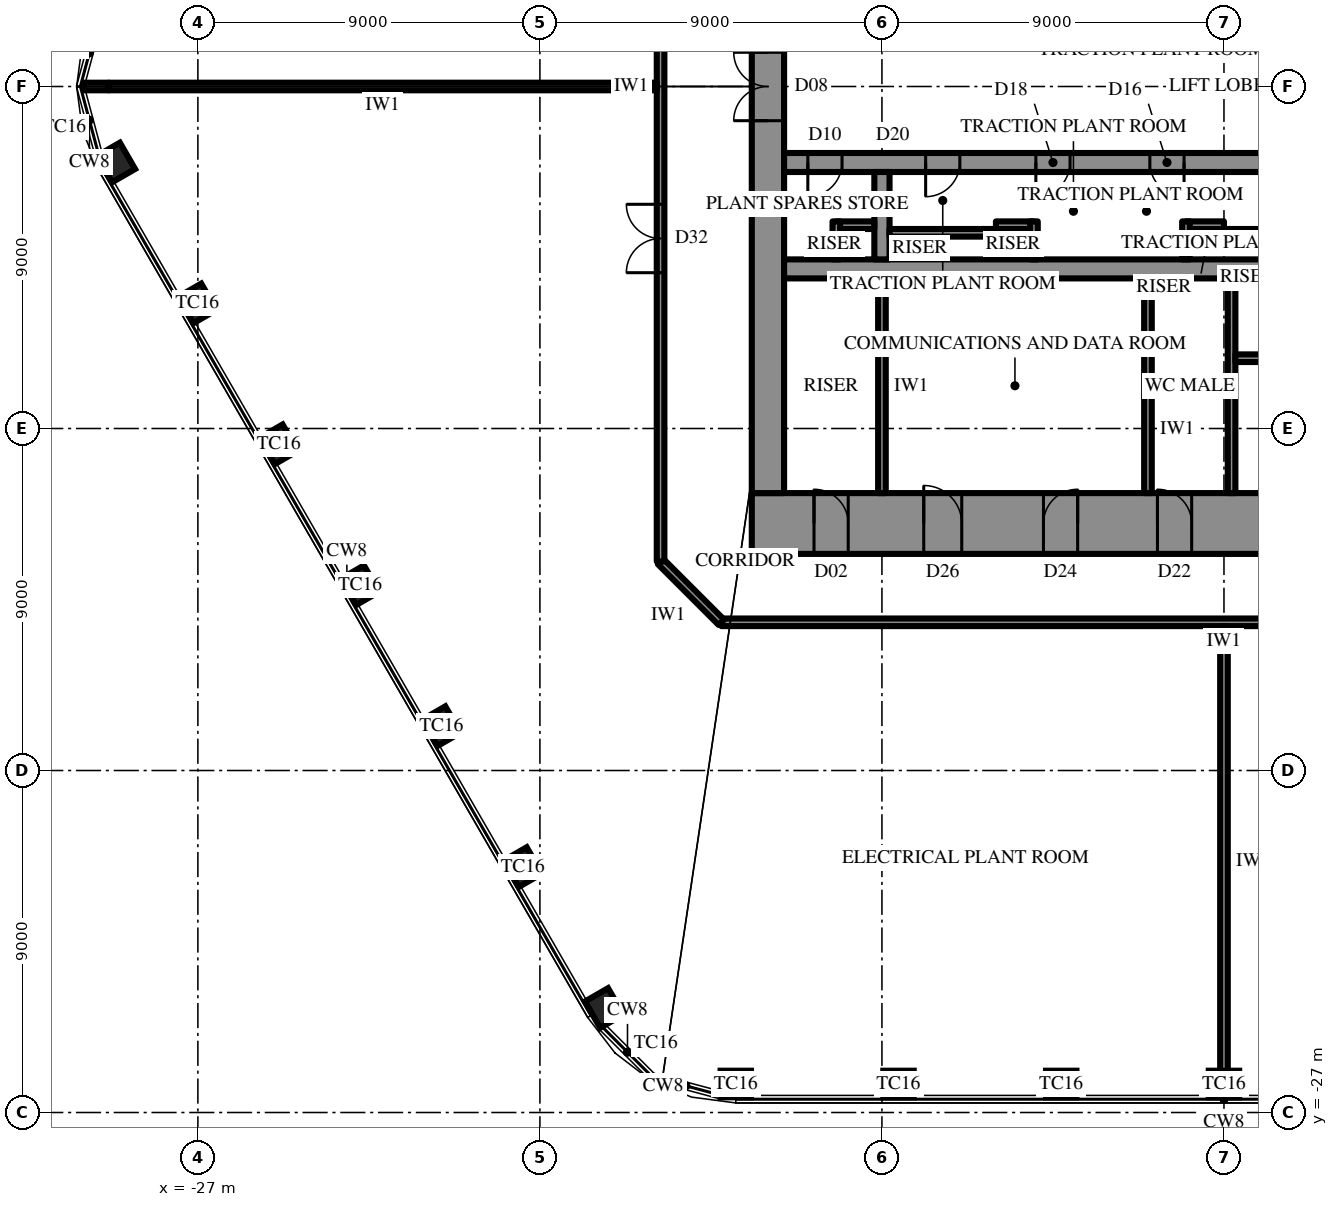
"""IFC4 building model, lengths in metres.
Left out: names, types, materials, properties, quantities, classifications, styles, units other than length and angle.
Written with IfcOpenShell. Run it as: python <this file> out.ifc"""

import sys

from ifc_helpers import new_model, si_unit, direction, frame, frame_2d, origin, origin_2d, place, context, subcontext, project, spatial, rectangle, extrude, element, fill, save


model = new_model("IFC4")
c1 = context("Model", 3, precision=1e-05, world=origin(), true_north=direction((0.0, 1.0)))
c2 = subcontext(c1, "Body", "Model", "MODEL_VIEW")
j1 = project(units=[si_unit("LENGTHUNIT", "METRE"), si_unit("PLANEANGLEUNIT", "RADIAN")], contexts=[c1])
p1 = place(None, origin())
s1 = spatial("IfcSite", under=j1, at=p1, CompositionType="ELEMENT")
p2 = place(p1, origin())
s2 = spatial("IfcBuilding", under=s1, at=p2, CompositionType="ELEMENT")
p3 = place(p2, frame((0.0, 0.0, 396.3)))
s3 = spatial("IfcBuildingStorey", under=s2, at=p3, CompositionType="ELEMENT", Elevation=396.3)
for number, where, z_axis, x_axis in (
    (1, (-29.156, -2.0, 0.0), (0.0, 0.0, 1.0), (0.5, -0.866, 0.0)),
    (2, (-27.015, -5.708, 0.0), (0.0, 0.0, 1.0), (0.5, -0.866, 0.0)),
    (3, (-24.874, -9.417, 0.0), (0.0, 0.0, 1.0), (0.5, -0.866, 0.0)),
    (4, (-22.733, -13.125, 0.0), (0.0, 0.0, 1.0), (0.5, -0.866, 0.0)),
    (5, (-20.592, -16.833, 0.0), (0.0, 0.0, 1.0), (0.5, -0.866, 0.0)),
    (6, (-18.451, -20.542, 0.0), (0.0, 0.0, 1.0), (0.5, -0.866, 0.0)),
    (7, (-16.31, -24.25, 0.0), (0.0, 0.0, 1.0), (0.5, -0.866, 0.0)),
    (8, (-12.846, -26.25, 0.0), (0.0, 0.0, 1.0), (1.0, 0.0, 0.0)),
    (9, (-8.564, -26.25, 0.0), (0.0, 0.0, 1.0), (1.0, 0.0, 0.0)),
    (10, (-4.282, -26.25, 0.0), (0.0, 0.0, 1.0), (1.0, 0.0, 0.0)),
    (11, (0.0, -26.25, 0.0), (0.0, 0.0, 1.0), (1.0, 0.0, 0.0)),
):
    element("IfcColumn", number, at=place(p3, frame(where, z_axis=z_axis, x_axis=x_axis)), inside=s3, PredefinedType="COLUMN", context=c2, shape_type="SweptSolid", body=[
        extrude(rectangle(XDim=0.8, YDim=0.7, at=origin_2d()), origin(), (0.0, 0.0, 1.0), 6.0),
    ])
p4 = place(p3, frame((12.425, -11.5, 0.0), z_axis=(0.0, 0.0, 1.0), x_axis=(-1.0, 0.0, 0.0)))
e12 = element("IfcWall", 12, at=p4, inside=s3, PredefinedType="SHEAR", context=c2, shape_type="SweptSolid", body=[
    extrude(rectangle(XDim=24.85, YDim=1.6, at=frame_2d((12.425, 0.0))), origin(), (0.0, 0.0, 1.0), 6.0),
])
p5 = place(p4, frame((13.275, 0.0, 0.0)))
e13 = element("IfcOpeningElement", 13, at=p5, cuts=e12, PredefinedType="OPENING", context=c2, shape_type="SweptSolid", body=[
    extrude(rectangle(XDim=0.9, YDim=2.2, at=frame_2d((0.45, 1.1))), frame((0.0, 0.81, 0.0), z_axis=(0.0, -1.0, 0.0), x_axis=(1.0, 0.0, 0.0)), (0.0, 0.0, 1.0), 1.62),
])
p6 = place(p4, frame((16.275, 0.0, 0.0)))
e14 = element("IfcOpeningElement", 14, at=p6, cuts=e12, PredefinedType="OPENING", context=c2, shape_type="SweptSolid", body=[
    extrude(rectangle(XDim=0.9, YDim=2.2, at=frame_2d((0.45, 1.1))), frame((0.0, 0.81, 0.0), z_axis=(0.0, -1.0, 0.0), x_axis=(1.0, 0.0, 0.0)), (0.0, 0.0, 1.0), 1.62),
])
p7 = place(p4, frame((19.325, 0.0, 0.0)))
e15 = element("IfcOpeningElement", 15, at=p7, cuts=e12, PredefinedType="OPENING", context=c2, shape_type="SweptSolid", body=[
    extrude(rectangle(XDim=1.0, YDim=2.2, at=frame_2d((0.5, 1.1))), frame((0.0, 0.81, 0.0), z_axis=(0.0, -1.0, 0.0), x_axis=(1.0, 0.0, 0.0)), (0.0, 0.0, 1.0), 1.62),
])
p8 = place(p4, frame((1.637, 0.0, 0.0)))
e16 = element("IfcOpeningElement", 16, at=p8, cuts=e12, PredefinedType="OPENING", context=c2, shape_type="SweptSolid", body=[
    extrude(rectangle(XDim=0.9, YDim=2.2, at=frame_2d((0.45, 1.1))), frame((0.0, 0.81, 0.0), z_axis=(0.0, -1.0, 0.0), x_axis=(1.0, 0.0, 0.0)), (0.0, 0.0, 1.0), 1.62),
])
p9 = place(p4, frame((22.312, 0.0, 0.0)))
e17 = element("IfcOpeningElement", 17, at=p9, cuts=e12, PredefinedType="OPENING", context=c2, shape_type="SweptSolid", body=[
    extrude(rectangle(XDim=0.9, YDim=2.2, at=frame_2d((0.45, 1.1))), frame((0.0, 0.81, 0.0), z_axis=(0.0, -1.0, 0.0), x_axis=(1.0, 0.0, 0.0)), (0.0, 0.0, 1.0), 1.62),
])
p10 = place(p3, frame((-12.0, 10.7, 0.0), z_axis=(0.0, 0.0, 1.0), x_axis=(0.0, -1.0, 0.0)))
e18 = element("IfcWall", 18, at=p10, inside=s3, PredefinedType="SHEAR", context=c2, shape_type="SweptSolid", body=[
    extrude(rectangle(XDim=21.4, YDim=0.85, at=frame_2d((10.7, 0.0))), origin(), (0.0, 0.0, 1.0), 6.0),
])
p11 = place(p10, frame((9.8, 0.0, 0.0)))
e19 = element("IfcOpeningElement", 19, at=p11, cuts=e18, PredefinedType="OPENING", context=c2, shape_type="SweptSolid", body=[
    extrude(rectangle(XDim=1.8, YDim=2.4, at=frame_2d((0.9, 1.2))), frame((0.0, 0.435, 0.0), z_axis=(0.0, -1.0, 0.0), x_axis=(1.0, 0.0, 0.0)), (0.0, 0.0, 1.0), 0.87),
])
p12 = place(p3, frame((3.2, -2.0, 0.0), z_axis=(0.0, 0.0, 1.0), x_axis=(-1.0, 0.0, 0.0)))
e20 = element("IfcWall", 20, at=p12, inside=s3, PredefinedType="SHEAR", context=c2, shape_type="SweptSolid", body=[
    extrude(rectangle(XDim=14.775, YDim=0.5, at=frame_2d((7.387, 0.0))), origin(), (0.0, 0.0, 1.0), 6.0),
])
p13 = place(p12, frame((1.35, 0.0, 0.0)))
e21 = element("IfcOpeningElement", 21, at=p13, cuts=e20, PredefinedType="OPENING", context=c2, shape_type="SweptSolid", body=[
    extrude(rectangle(XDim=0.9, YDim=2.2, at=frame_2d((0.45, 1.1))), frame((0.0, 0.26, 0.0), z_axis=(0.0, -1.0, 0.0), x_axis=(1.0, 0.0, 0.0)), (0.0, 0.0, 1.0), 0.52),
])
p14 = place(p12, frame((4.25, 0.0, 0.0)))
e22 = element("IfcOpeningElement", 22, at=p14, cuts=e20, PredefinedType="OPENING", context=c2, shape_type="SweptSolid", body=[
    extrude(rectangle(XDim=0.9, YDim=2.2, at=frame_2d((0.45, 1.1))), frame((0.0, 0.26, 0.0), z_axis=(0.0, -1.0, 0.0), x_axis=(1.0, 0.0, 0.0)), (0.0, 0.0, 1.0), 0.52),
])
p15 = place(p12, frame((7.25, 0.0, 0.0)))
e23 = element("IfcOpeningElement", 23, at=p15, cuts=e20, PredefinedType="OPENING", context=c2, shape_type="SweptSolid", body=[
    extrude(rectangle(XDim=0.9, YDim=2.2, at=frame_2d((0.45, 1.1))), frame((0.0, 0.26, 0.0), z_axis=(0.0, -1.0, 0.0), x_axis=(1.0, 0.0, 0.0)), (0.0, 0.0, 1.0), 0.52),
])
p16 = place(p12, frame((10.15, 0.0, 0.0)))
e24 = element("IfcOpeningElement", 24, at=p16, cuts=e20, PredefinedType="OPENING", context=c2, shape_type="SweptSolid", body=[
    extrude(rectangle(XDim=0.9, YDim=2.2, at=frame_2d((0.45, 1.1))), frame((0.0, 0.26, 0.0), z_axis=(0.0, -1.0, 0.0), x_axis=(1.0, 0.0, 0.0)), (0.0, 0.0, 1.0), 0.52),
])
p17 = place(p12, frame((13.25, 0.0, 0.0)))
e25 = element("IfcOpeningElement", 25, at=p17, cuts=e20, PredefinedType="OPENING", context=c2, shape_type="SweptSolid", body=[
    extrude(rectangle(XDim=0.9, YDim=2.2, at=frame_2d((0.45, 1.1))), frame((0.0, 0.26, 0.0), z_axis=(0.0, -1.0, 0.0), x_axis=(1.0, 0.0, 0.0)), (0.0, 0.0, 1.0), 0.52),
])
p18 = place(p3, frame((11.575, -4.8, 0.0), z_axis=(0.0, 0.0, 1.0), x_axis=(-1.0, 0.0, 0.0)))
e26 = element("IfcWall", 26, at=p18, inside=s3, PredefinedType="SHEAR", context=c2, shape_type="SweptSolid", body=[
    extrude(rectangle(XDim=23.15, YDim=0.5, at=frame_2d((11.575, 0.0))), origin(), (0.0, 0.0, 1.0), 6.0),
])
p19 = place(p18, frame((6.475, 0.0, 0.0)))
e27 = element("IfcOpeningElement", 27, at=p19, cuts=e26, PredefinedType="OPENING", context=c2, shape_type="SweptSolid", body=[
    extrude(rectangle(XDim=1.2, YDim=2.2, at=frame_2d((0.6, 1.1))), frame((0.0, 0.26, 0.0), z_axis=(0.0, -1.0, 0.0), x_axis=(1.0, 0.0, 0.0)), (0.0, 0.0, 1.0), 0.52),
])
p20 = place(p18, frame((3.475, 0.0, 0.0)))
e28 = element("IfcOpeningElement", 28, at=p20, cuts=e26, PredefinedType="OPENING", context=c2, shape_type="SweptSolid", body=[
    extrude(rectangle(XDim=1.2, YDim=2.2, at=frame_2d((0.6, 1.1))), frame((0.0, 0.26, 0.0), z_axis=(0.0, -1.0, 0.0), x_axis=(1.0, 0.0, 0.0)), (0.0, 0.0, 1.0), 0.52),
])
p21 = place(p3, frame((-9.0, -2.25, 0.0), z_axis=(0.0, 0.0, 1.0), x_axis=(0.0, -1.0, 0.0)))
e29 = element("IfcWall", 29, at=p21, inside=s3, PredefinedType="SHEAR", context=c2, shape_type="SweptSolid", body=[
    extrude(rectangle(XDim=2.3, YDim=0.4, at=frame_2d((1.15, 0.0))), origin(), (0.0, 0.0, 1.0), 6.0),
])
p22 = place(p3, frame((0.2, -5.05, 0.0), z_axis=(0.0, 0.0, 1.0), x_axis=(0.0, -1.0, 0.0)))
e30 = element("IfcWall", 30, at=p22, inside=s3, PredefinedType="SHEAR", context=c2, shape_type="SweptSolid", body=[
    extrude(rectangle(XDim=5.65, YDim=0.2, at=frame_2d((2.825, 0.0))), origin(), (0.0, 0.0, 1.0), 6.0),
])
p23 = place(p3, frame((8.9, -7.15, 0.0), z_axis=(0.0, 0.0, 1.0), x_axis=(-1.0, 0.0, 0.0)))
e31 = element("IfcWall", 31, at=p23, inside=s3, PredefinedType="SHEAR", context=c2, shape_type="SweptSolid", body=[
    extrude(rectangle(XDim=8.6, YDim=0.2, at=frame_2d((4.3, 0.0))), origin(), (0.0, 0.0, 1.0), 6.0),
])
p24 = place(p23, frame((0.3, 0.0, 0.0)))
e32 = element("IfcOpeningElement", 32, at=p24, cuts=e31, PredefinedType="OPENING", context=c2, shape_type="SweptSolid", body=[
    extrude(rectangle(XDim=1.0, YDim=2.2, at=frame_2d((0.5, 1.1))), frame((0.0, 0.11, 0.0), z_axis=(0.0, -1.0, 0.0), x_axis=(1.0, 0.0, 0.0)), (0.0, 0.0, 1.0), 0.22),
])
for number, where, z_axis, x_axis in (
    (33, (-9.0, -5.05, 0.0), (0.0, 0.0, 1.0), (0.0, -1.0, 0.0)),
    (34, (-2.0, -5.05, 0.0), (0.0, 0.0, 1.0), (0.0, -1.0, 0.0)),
):
    element("IfcWall", number, at=place(p3, frame(where, z_axis=z_axis, x_axis=x_axis)), inside=s3, PredefinedType="PARTITIONING", context=c2, shape_type="SweptSolid", body=[
        extrude(rectangle(XDim=5.65, YDim=0.2, at=frame_2d((2.825, 0.0))), origin(), (0.0, 0.0, 1.0), 5.8),
    ])
p25 = place(p3, frame((2.8, -3.85, 0.0), z_axis=(0.0, 0.0, 1.0), x_axis=(-1.0, 0.0, 0.0)))
e35 = element("IfcWall", 35, at=p25, inside=s3, PredefinedType="PARTITIONING", context=c2, shape_type="SweptSolid", body=[
    extrude(rectangle(XDim=2.8, YDim=0.2, at=frame_2d((1.4, 0.0))), origin(), (0.0, 0.0, 1.0), 5.8),
])
for number, where, z_axis, x_axis in (
    (36, (0.0, -3.65, 0.0), (0.0, 0.0, 1.0), (-1.0, 0.0, 0.0)),
    (37, (-1.0, -3.55, 0.0), (0.0, 0.0, 1.0), (0.0, -1.0, 0.0)),
    (38, (-5.0, -3.65, 0.0), (0.0, 0.0, 1.0), (-1.0, 0.0, 0.0)),
    (39, (-5.0, -3.55, 0.0), (0.0, 0.0, 1.0), (0.0, -1.0, 0.0)),
):
    element("IfcWall", number, at=place(p3, frame(where, z_axis=z_axis, x_axis=x_axis)), inside=s3, PredefinedType="PARTITIONING", context=c2, shape_type="SweptSolid", body=[
        extrude(rectangle(XDim=1.0, YDim=0.2, at=frame_2d((0.5, 0.0))), origin(), (0.0, 0.0, 1.0), 5.8),
    ])
p26 = place(p3, frame((-6.0, -3.85, 0.0), z_axis=(0.0, 0.0, 1.0), x_axis=(-1.0, 0.0, 0.0)))
e40 = element("IfcWall", 40, at=p26, inside=s3, PredefinedType="PARTITIONING", context=c2, shape_type="SweptSolid", body=[
    extrude(rectangle(XDim=2.8, YDim=0.2, at=frame_2d((1.4, 0.0))), origin(), (0.0, 0.0, 1.0), 5.8),
])
for number, where, z_axis, x_axis in (
    (41, (-9.2, -3.65, 0.0), (0.0, 0.0, 1.0), (-1.0, 0.0, 0.0)),
    (42, (-10.2, -3.55, 0.0), (0.0, 0.0, 1.0), (0.0, -1.0, 0.0)),
):
    element("IfcWall", number, at=place(p3, frame(where, z_axis=z_axis, x_axis=x_axis)), inside=s3, PredefinedType="PARTITIONING", context=c2, shape_type="SweptSolid", body=[
        extrude(rectangle(XDim=1.0, YDim=0.2, at=frame_2d((0.5, 0.0))), origin(), (0.0, 0.0, 1.0), 5.8),
    ])
p27 = place(p3, frame((13.225, -14.1, 0.0), z_axis=(0.0, 0.0, 1.0), x_axis=(-1.0, 0.0, 0.0)))
e43 = element("IfcWall", 43, at=p27, inside=s3, PredefinedType="PARTITIONING", context=c2, shape_type="SweptSolid", body=[
    extrude(rectangle(XDim=26.45, YDim=0.2, at=frame_2d((13.225, 0.0))), origin(), (0.0, 0.0, 1.0), 5.8),
])
p28 = place(p27, frame((6.113, 0.0, 0.0)))
e44 = element("IfcOpeningElement", 44, at=p28, cuts=e43, PredefinedType="OPENING", context=c2, shape_type="SweptSolid", body=[
    extrude(rectangle(XDim=1.0, YDim=2.2, at=frame_2d((0.5, 1.1))), frame((0.0, 0.11, 0.0), z_axis=(0.0, -1.0, 0.0), x_axis=(1.0, 0.0, 0.0)), (0.0, 0.0, 1.0), 0.22),
])
p29 = place(p3, frame((-13.225, -14.1, 0.0), z_axis=(0.0, 0.0, 1.0), x_axis=(-0.707052830339, 0.707160727918, 0.0)))
e45 = element("IfcWall", 45, at=p29, inside=s3, PredefinedType="PARTITIONING", context=c2, shape_type="SweptSolid", body=[
    extrude(rectangle(XDim=2.263, YDim=0.2, at=frame_2d((1.131, 0.0))), origin(), (0.0, 0.0, 1.0), 5.8),
])
p30 = place(p3, frame((-14.825, -12.5, 0.0), z_axis=(0.0, 0.0, 1.0), x_axis=(0.0, 1.0, 0.0)))
e46 = element("IfcWall", 46, at=p30, inside=s3, PredefinedType="PARTITIONING", context=c2, shape_type="SweptSolid", body=[
    extrude(rectangle(XDim=25.0, YDim=0.2, at=frame_2d((12.5, 0.0))), origin(), (0.0, 0.0, 1.0), 5.8),
])
p31 = place(p30, frame((15.6, 0.0, 0.0)))
e47 = element("IfcOpeningElement", 47, at=p31, cuts=e46, PredefinedType="OPENING", context=c2, shape_type="SweptSolid", body=[
    extrude(rectangle(XDim=1.8, YDim=2.4, at=frame_2d((0.9, 1.2))), frame((0.0, 0.11, 0.0), z_axis=(0.0, -1.0, 0.0), x_axis=(1.0, 0.0, 0.0)), (0.0, 0.0, 1.0), 0.22),
])
p32 = place(p30, frame((7.6, 0.0, 0.0)))
e48 = element("IfcOpeningElement", 48, at=p32, cuts=e46, PredefinedType="OPENING", context=c2, shape_type="SweptSolid", body=[
    extrude(rectangle(XDim=1.8, YDim=2.4, at=frame_2d((0.9, 1.2))), frame((0.0, 0.11, 0.0), z_axis=(0.0, -1.0, 0.0), x_axis=(1.0, 0.0, 0.0)), (0.0, 0.0, 1.0), 0.22),
])
p33 = place(p3, frame((0.0, -14.2, 0.0), z_axis=(0.0, 0.0, 1.0), x_axis=(0.0, -1.0, 0.0)))
e49 = element("IfcWall", 49, at=p33, inside=s3, PredefinedType="PARTITIONING", context=c2, shape_type="SweptSolid", body=[
    extrude(rectangle(XDim=12.36, YDim=0.2, at=frame_2d((6.18, 0.0))), origin(), (0.0, 0.0, 1.0), 4.792),
])
p34 = place(p3, frame((-14.925, 0.0, 0.0), z_axis=(0.0, 0.0, 1.0), x_axis=(-1.0, 0.0, 0.0)))
e50 = element("IfcWall", 50, at=p34, inside=s3, PredefinedType="PARTITIONING", context=c2, shape_type="SweptSolid", body=[
    extrude(rectangle(XDim=14.422, YDim=0.2, at=frame_2d((7.211, 0.0))), origin(), (0.0, 0.0, 1.0), 4.744),
])
p35 = place(p3, frame((-29.347, 0.0, 0.0), z_axis=(0.0, 0.0, 1.0), x_axis=(-1.0, 0.0, 0.0)))
e51 = element("IfcWall", 51, at=p35, inside=s3, PredefinedType="PARTITIONING", context=c2, shape_type="SweptSolid", body=[
    extrude(rectangle(XDim=0.657, YDim=0.2, at=frame_2d((0.328, 0.0))), origin(), (0.0, 0.0, 1.0), 5.8),
])
p36 = place(p11, frame((1.8, 0.0, 0.0), z_axis=(0.0, 0.0, 1.0), x_axis=(-1.0, 0.0, 0.0)))
e52 = element("IfcDoor", 52, at=p36, inside=s3, OperationType="DOUBLE_DOOR_SINGLE_SWING", PredefinedType="DOOR", context=c2, shape_type="SweptSolid", body=[
    extrude(rectangle(XDim=1.8, YDim=2.4, at=frame_2d((0.9, 1.2))), frame((0.0, 0.025, 0.0), z_axis=(0.0, -1.0, 0.0), x_axis=(1.0, 0.0, 0.0)), (0.0, 0.0, 1.0), 0.05),
])
fill(e19, e52)
p37 = place(p5, frame((0.9, 0.0, 0.0), z_axis=(0.0, 0.0, 1.0), x_axis=(-1.0, 0.0, 0.0)))
e53 = element("IfcDoor", 53, at=p37, inside=s3, OperationType="SINGLE_SWING_RIGHT", PredefinedType="DOOR", context=c2, shape_type="SweptSolid", body=[
    extrude(rectangle(XDim=0.9, YDim=2.2, at=frame_2d((0.45, 1.1))), frame((0.0, 0.025, 0.0), z_axis=(0.0, -1.0, 0.0), x_axis=(1.0, 0.0, 0.0)), (0.0, 0.0, 1.0), 0.05),
])
fill(e13, e53)
p38 = place(p6, frame((0.9, 0.0, 0.0), z_axis=(0.0, 0.0, 1.0), x_axis=(-1.0, 0.0, 0.0)))
e54 = element("IfcDoor", 54, at=p38, inside=s3, OperationType="SINGLE_SWING_LEFT", PredefinedType="DOOR", context=c2, shape_type="SweptSolid", body=[
    extrude(rectangle(XDim=0.9, YDim=2.2, at=frame_2d((0.45, 1.1))), frame((0.0, 0.025, 0.0), z_axis=(0.0, -1.0, 0.0), x_axis=(1.0, 0.0, 0.0)), (0.0, 0.0, 1.0), 0.05),
])
fill(e14, e54)
p39 = place(p7, frame((1.0, 0.0, 0.0), z_axis=(0.0, 0.0, 1.0), x_axis=(-1.0, 0.0, 0.0)))
e55 = element("IfcDoor", 55, at=p39, inside=s3, OperationType="SINGLE_SWING_RIGHT", PredefinedType="DOOR", context=c2, shape_type="SweptSolid", body=[
    extrude(rectangle(XDim=1.0, YDim=2.2, at=frame_2d((0.5, 1.1))), frame((0.0, 0.025, 0.0), z_axis=(0.0, -1.0, 0.0), x_axis=(1.0, 0.0, 0.0)), (0.0, 0.0, 1.0), 0.05),
])
fill(e15, e55)
p40 = place(p9, frame((0.9, 0.0, 0.0), z_axis=(0.0, 0.0, 1.0), x_axis=(-1.0, 0.0, 0.0)))
e56 = element("IfcDoor", 56, at=p40, inside=s3, OperationType="SINGLE_SWING_RIGHT", PredefinedType="DOOR", context=c2, shape_type="SweptSolid", body=[
    extrude(rectangle(XDim=0.9, YDim=2.2, at=frame_2d((0.45, 1.1))), frame((0.0, 0.025, 0.0), z_axis=(0.0, -1.0, 0.0), x_axis=(1.0, 0.0, 0.0)), (0.0, 0.0, 1.0), 0.05),
])
fill(e17, e56)
p41 = place(p14, origin())
e57 = element("IfcDoor", 57, at=p41, inside=s3, OperationType="SINGLE_SWING_RIGHT", PredefinedType="DOOR", context=c2, shape_type="SweptSolid", body=[
    extrude(rectangle(XDim=0.9, YDim=2.2, at=frame_2d((0.45, 1.1))), frame((0.0, 0.025, 0.0), z_axis=(0.0, -1.0, 0.0), x_axis=(1.0, 0.0, 0.0)), (0.0, 0.0, 1.0), 0.05),
])
fill(e22, e57)
p42 = place(p15, origin())
e58 = element("IfcDoor", 58, at=p42, inside=s3, OperationType="SINGLE_SWING_LEFT", PredefinedType="DOOR", context=c2, shape_type="SweptSolid", body=[
    extrude(rectangle(XDim=0.9, YDim=2.2, at=frame_2d((0.45, 1.1))), frame((0.0, 0.025, 0.0), z_axis=(0.0, -1.0, 0.0), x_axis=(1.0, 0.0, 0.0)), (0.0, 0.0, 1.0), 0.05),
])
fill(e23, e58)
p43 = place(p16, origin())
e59 = element("IfcDoor", 59, at=p43, inside=s3, OperationType="SINGLE_SWING_LEFT", PredefinedType="DOOR", context=c2, shape_type="SweptSolid", body=[
    extrude(rectangle(XDim=0.9, YDim=2.2, at=frame_2d((0.45, 1.1))), frame((0.0, 0.025, 0.0), z_axis=(0.0, -1.0, 0.0), x_axis=(1.0, 0.0, 0.0)), (0.0, 0.0, 1.0), 0.05),
])
fill(e24, e59)
p44 = place(p17, origin())
e60 = element("IfcDoor", 60, at=p44, inside=s3, OperationType="SINGLE_SWING_LEFT", PredefinedType="DOOR", context=c2, shape_type="SweptSolid", body=[
    extrude(rectangle(XDim=0.9, YDim=2.2, at=frame_2d((0.45, 1.1))), frame((0.0, 0.025, 0.0), z_axis=(0.0, -1.0, 0.0), x_axis=(1.0, 0.0, 0.0)), (0.0, 0.0, 1.0), 0.05),
])
fill(e25, e60)
p45 = place(p32, origin())
e61 = element("IfcDoor", 61, at=p45, inside=s3, OperationType="DOUBLE_DOOR_SINGLE_SWING", PredefinedType="DOOR", context=c2, shape_type="SweptSolid", body=[
    extrude(rectangle(XDim=1.8, YDim=2.4, at=frame_2d((0.9, 1.2))), frame((0.0, 0.025, 0.0), z_axis=(0.0, -1.0, 0.0), x_axis=(1.0, 0.0, 0.0)), (0.0, 0.0, 1.0), 0.05),
])
fill(e48, e61)
save(model, sys.argv[1])
